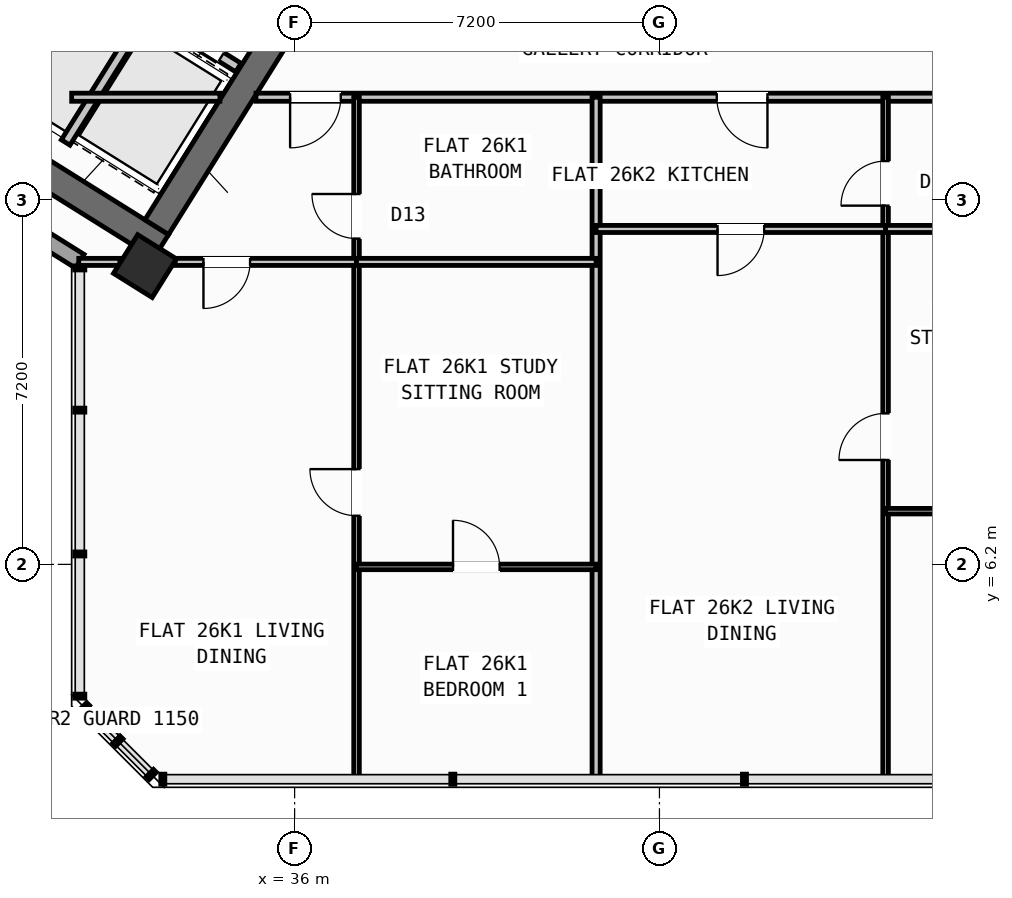
"""IFC4 building model, lengths in metres.
Left out: names, types, materials, properties, quantities, classifications, styles, units other than length and angle.
Written with IfcOpenShell. Run it as: python <this file> out.ifc"""

import sys

from ifc_helpers import new_model, si_unit, direction, frame, frame_2d, origin, origin_2d, place, context, subcontext, project, spatial, rectangle, hollow_rectangle, extrude, source, transform, mapped, element, fill, save


model = new_model("IFC4")
c1 = context("Model", 3, precision=1e-05, world=origin(), true_north=direction((0.0, 1.0)))
c2 = subcontext(c1, "Body", "Model", "MODEL_VIEW")
j1 = project(units=[si_unit("LENGTHUNIT", "METRE"), si_unit("PLANEANGLEUNIT", "RADIAN")], contexts=[c1])
p1 = place(None, origin())
s1 = spatial("IfcSite", under=j1, at=p1, CompositionType="ELEMENT")
p2 = place(p1, origin())
s2 = spatial("IfcBuilding", under=s1, at=p2, CompositionType="ELEMENT")
p3 = place(p2, frame((0.0, 0.0, 105.3)))
s3 = spatial("IfcBuildingStorey", under=s2, at=p3, CompositionType="ELEMENT", Elevation=105.3)
p4 = place(p3, frame((33.366, 12.477, 0.0), z_axis=(0.0, 0.0, 1.0), x_axis=(-0.848047359947, 0.529920442413, 0.0)))
e1 = element("IfcWall", 1, at=p4, inside=s3, PredefinedType="SHEAR", context=c2, shape_type="SweptSolid", body=[
    extrude(rectangle(XDim=13.14, YDim=0.55, at=frame_2d((6.57, 0.0))), origin(), (0.0, 0.0, 1.0), 3.35),
])
p5 = place(p3, frame((36.683, 18.304, 0.0), z_axis=(0.0, 0.0, 1.0), x_axis=(-0.529896466841, -0.848062341122, 0.0)))
e2 = element("IfcWall", 2, at=p5, inside=s3, PredefinedType="SHEAR", context=c2, shape_type="SweptSolid", body=[
    extrude(rectangle(XDim=6.425, YDim=0.55, at=frame_2d((3.212, 0.0))), origin(), (0.0, 0.0, 1.0), 3.35),
])
m1 = source(origin(), c2, "Body", "SweptSolid", [
    extrude(hollow_rectangle(XDim=0.9, YDim=0.9, WallThickness=0.036, at=origin_2d()), origin(), (0.0, 0.0, 1.0), 3.6),
])
p6 = place(p3, frame((33.046, 12.087, 0.0), z_axis=(0.0, 0.0, 1.0), x_axis=(-0.848048096156, 0.529919264233, 0.0)))
e3 = element("IfcColumn", 3, at=p6, inside=s3, PredefinedType="COLUMN", context=c2, shape_type="MappedRepresentation", body=[
    mapped(m1, transform((0.0, 0.0, 0.0), scale=1.0)),
])
p7 = place(p3, frame((31.76, 12.183, 0.0), z_axis=(0.0, 0.0, 1.0), x_axis=(-0.848047074256, 0.529920899612, 0.0)))
e4 = element("IfcWall", 4, at=p7, inside=s3, PredefinedType="STANDARD", context=c2, shape_type="SweptSolid", body=[
    extrude(rectangle(XDim=30.652, YDim=0.32, at=frame_2d((15.326, 0.0))), origin(), (0.0, 0.0, 1.0), 3.35),
])
p8 = place(p7, frame((15.153, 0.0, 0.0)))
e5 = element("IfcOpeningElement", 5, at=p8, cuts=e4, PredefinedType="OPENING", context=c2, shape_type="SweptSolid", body=[
    extrude(rectangle(XDim=1.2, YDim=2.15, at=frame_2d((0.6, 1.075))), frame((0.0, 0.17, 0.0), z_axis=(0.0, -1.0, 0.0), x_axis=(1.0, 0.0, 0.0)), (0.0, 0.0, 1.0), 0.34),
])
p9 = place(p7, frame((2.002, 0.0, 0.8)))
e6 = element("IfcOpeningElement", 6, at=p9, cuts=e4, PredefinedType="OPENING", context=c2, shape_type="SweptSolid", body=[
    extrude(rectangle(XDim=2.1, YDim=1.55, at=frame_2d((1.05, 0.775))), frame((0.0, 0.17, 0.0), z_axis=(0.0, -1.0, 0.0), x_axis=(1.0, 0.0, 0.0)), (0.0, 0.0, 1.0), 0.34),
])
p10 = place(p7, frame((7.206, 0.0, 0.8)))
e7 = element("IfcOpeningElement", 7, at=p10, cuts=e4, PredefinedType="OPENING", context=c2, shape_type="SweptSolid", body=[
    extrude(rectangle(XDim=2.1, YDim=1.55, at=frame_2d((1.05, 0.775))), frame((0.0, 0.17, 0.0), z_axis=(0.0, -1.0, 0.0), x_axis=(1.0, 0.0, 0.0)), (0.0, 0.0, 1.0), 0.34),
])
p11 = place(p7, frame((12.648, 0.0, 1.0)))
e8 = element("IfcOpeningElement", 8, at=p11, cuts=e4, PredefinedType="OPENING", context=c2, shape_type="SweptSolid", body=[
    extrude(rectangle(XDim=0.9, YDim=1.25, at=frame_2d((0.45, 0.625))), frame((0.0, 0.17, 0.0), z_axis=(0.0, -1.0, 0.0), x_axis=(1.0, 0.0, 0.0)), (0.0, 0.0, 1.0), 0.34),
])
p12 = place(p7, frame((20.628, 0.0, 0.95)))
e9 = element("IfcOpeningElement", 9, at=p12, cuts=e4, PredefinedType="OPENING", context=c2, shape_type="SweptSolid", body=[
    extrude(rectangle(XDim=1.2, YDim=1.4, at=frame_2d((0.6, 0.7))), frame((0.0, 0.17, 0.0), z_axis=(0.0, -1.0, 0.0), x_axis=(1.0, 0.0, 0.0)), (0.0, 0.0, 1.0), 0.34),
])
p13 = place(p7, frame((26.008, 0.0, 1.0)))
e10 = element("IfcOpeningElement", 10, at=p13, cuts=e4, PredefinedType="OPENING", context=c2, shape_type="SweptSolid", body=[
    extrude(rectangle(XDim=0.9, YDim=1.25, at=frame_2d((0.45, 0.625))), frame((0.0, 0.17, 0.0), z_axis=(0.0, -1.0, 0.0), x_axis=(1.0, 0.0, 0.0)), (0.0, 0.0, 1.0), 0.34),
])
p14 = place(p7, frame((28.408, 0.0, 1.0)))
e11 = element("IfcOpeningElement", 11, at=p14, cuts=e4, PredefinedType="OPENING", context=c2, shape_type="SweptSolid", body=[
    extrude(rectangle(XDim=0.9, YDim=1.25, at=frame_2d((0.45, 0.625))), frame((0.0, 0.17, 0.0), z_axis=(0.0, -1.0, 0.0), x_axis=(1.0, 0.0, 0.0)), (0.0, 0.0, 1.0), 0.34),
])
p15 = place(p3, frame((31.288, 18.256, 0.0), z_axis=(0.0, 0.0, 1.0), x_axis=(-0.529943379326, -0.848033026897, 0.0)))
e12 = element("IfcWall", 12, at=p15, inside=s3, PredefinedType="SHEAR", context=c2, shape_type="SweptSolid", body=[
    extrude(rectangle(XDim=3.16, YDim=0.26, at=frame_2d((1.58, 0.0))), origin(), (0.0, 0.0, 1.0), 3.35),
])
p16 = place(p3, frame((34.891, 16.005, 0.0), z_axis=(0.0, 0.0, 1.0), x_axis=(-0.848062873452, 0.529895614884, 0.0)))
e13 = element("IfcWall", 13, at=p16, inside=s3, PredefinedType="STANDARD", context=c2, shape_type="SweptSolid", body=[
    extrude(rectangle(XDim=4.248, YDim=0.2, at=frame_2d((2.124, 0.0))), origin(), (0.0, 0.0, 1.0), 3.34),
])
p17 = place(p16, frame((0.398, 0.0, 0.0)))
e14 = element("IfcOpeningElement", 14, at=p17, cuts=e13, PredefinedType="OPENING", context=c2, shape_type="SweptSolid", body=[
    extrude(rectangle(XDim=1.3, YDim=2.2, at=frame_2d((0.65, 1.1))), frame((0.0, 0.11, 0.0), z_axis=(0.0, -1.0, 0.0), x_axis=(1.0, 0.0, 0.0)), (0.0, 0.0, 1.0), 0.22),
])
p18 = place(p16, frame((2.473, 0.0, 0.0)))
e15 = element("IfcOpeningElement", 15, at=p18, cuts=e13, PredefinedType="OPENING", context=c2, shape_type="SweptSolid", body=[
    extrude(rectangle(XDim=1.45, YDim=2.25, at=frame_2d((0.725, 1.125))), frame((0.0, 0.11, 0.0), z_axis=(0.0, -1.0, 0.0), x_axis=(1.0, 0.0, 0.0)), (0.0, 0.0, 1.0), 0.22),
])
p19 = place(p3, frame((33.029, 17.003, 0.0), z_axis=(0.0, 0.0, 1.0), x_axis=(-0.529916267533, -0.848049968695, 0.0)))
e16 = element("IfcWall", 16, at=p19, inside=s3, PredefinedType="STANDARD", context=c2, shape_type="SweptSolid", body=[
    extrude(rectangle(XDim=2.92, YDim=0.2, at=frame_2d((1.46, 0.0))), origin(), (0.0, 0.0, 1.0), 3.34),
])
p20 = place(p3, frame((31.6, 15.42, 0.0), z_axis=(0.0, 0.0, 1.0), x_axis=(1.0, 0.0, 0.0)))
e17 = element("IfcWall", 17, at=p20, inside=s3, PredefinedType="PARTITIONING", context=c2, shape_type="SweptSolid", body=[
    extrude(rectangle(XDim=2.925, YDim=0.16, at=frame_2d((1.462, 0.0))), origin(), (0.0, 0.0, 1.0), 3.34),
])
p21 = place(p3, frame((35.237, 15.42, 0.0), z_axis=(0.0, 0.0, 1.0), x_axis=(1.0, 0.0, 0.0)))
e18 = element("IfcWall", 18, at=p21, inside=s3, PredefinedType="PARTITIONING", context=c2, shape_type="SweptSolid", body=[
    extrude(rectangle(XDim=15.432, YDim=0.16, at=frame_2d((7.716, 0.0))), origin(), (0.0, 0.0, 1.0), 3.34),
])
p22 = place(p21, frame((0.674, 0.0, 0.0)))
e19 = element("IfcOpeningElement", 19, at=p22, cuts=e18, PredefinedType="OPENING", context=c2, shape_type="SweptSolid", body=[
    extrude(rectangle(XDim=1.0, YDim=2.1, at=frame_2d((0.5, 1.05))), frame((0.0, 0.09, 0.0), z_axis=(0.0, -1.0, 0.0), x_axis=(1.0, 0.0, 0.0)), (0.0, 0.0, 1.0), 0.18),
])
p23 = place(p21, frame((9.094, 0.0, 0.0)))
e20 = element("IfcOpeningElement", 20, at=p23, cuts=e18, PredefinedType="OPENING", context=c2, shape_type="SweptSolid", body=[
    extrude(rectangle(XDim=1.0, YDim=2.1, at=frame_2d((0.5, 1.05))), frame((0.0, 0.09, 0.0), z_axis=(0.0, -1.0, 0.0), x_axis=(1.0, 0.0, 0.0)), (0.0, 0.0, 1.0), 0.18),
])
p24 = place(p3, frame((50.119, 16.333, 0.0), z_axis=(0.0, 0.0, 1.0), x_axis=(-0.587749856981, 0.809042709391, 0.0)))
e21 = element("IfcWall", 21, at=p24, inside=s3, PredefinedType="STANDARD", context=c2, shape_type="SweptSolid", body=[
    extrude(rectangle(XDim=2.96, YDim=0.2, at=frame_2d((1.48, 0.0))), origin(), (0.0, 0.0, 1.0), 3.34),
])
p25 = place(p24, frame((0.53, 0.0, 0.0)))
e22 = element("IfcOpeningElement", 22, at=p25, cuts=e21, PredefinedType="OPENING", context=c2, shape_type="SweptSolid", body=[
    extrude(rectangle(XDim=1.5, YDim=2.15, at=frame_2d((0.75, 1.075))), frame((0.0, 0.11, 0.0), z_axis=(0.0, -1.0, 0.0), x_axis=(1.0, 0.0, 0.0)), (0.0, 0.0, 1.0), 0.22),
])
p26 = place(p3, frame((41.95, 1.96, 0.0), z_axis=(0.0, 0.0, 1.0), x_axis=(0.0, 1.0, 0.0)))
e23 = element("IfcWall", 23, at=p26, inside=s3, PredefinedType="PARTITIONING", context=c2, shape_type="SweptSolid", body=[
    extrude(rectangle(XDim=13.46, YDim=0.16, at=frame_2d((6.73, 0.0))), origin(), (0.0, 0.0, 1.0), 3.34),
])
p27 = place(p3, frame((37.222, 1.96, 0.0), z_axis=(0.0, 0.0, 1.0), x_axis=(0.0, 1.0, 0.0)))
e24 = element("IfcWall", 24, at=p27, inside=s3, PredefinedType="PARTITIONING", context=c2, shape_type="SweptSolid", body=[
    extrude(rectangle(XDim=13.46, YDim=0.11, at=frame_2d((6.73, 0.0))), origin(), (0.0, 0.0, 1.0), 3.34),
])
p28 = place(p27, frame((5.2, 0.0, 0.0)))
e25 = element("IfcOpeningElement", 25, at=p28, cuts=e24, PredefinedType="OPENING", context=c2, shape_type="SweptSolid", body=[
    extrude(rectangle(XDim=0.92, YDim=2.08, at=frame_2d((0.46, 1.04))), frame((0.0, 0.065, 0.0), z_axis=(0.0, -1.0, 0.0), x_axis=(1.0, 0.0, 0.0)), (0.0, 0.0, 1.0), 0.13),
])
p29 = place(p27, frame((10.67, 0.0, 0.0)))
e26 = element("IfcOpeningElement", 26, at=p29, cuts=e24, PredefinedType="OPENING", context=c2, shape_type="SweptSolid", body=[
    extrude(rectangle(XDim=0.88, YDim=2.08, at=frame_2d((0.44, 1.04))), frame((0.0, 0.065, 0.0), z_axis=(0.0, -1.0, 0.0), x_axis=(1.0, 0.0, 0.0)), (0.0, 0.0, 1.0), 0.13),
])
p30 = place(p3, frame((31.74, 12.17, 0.0), z_axis=(0.0, 0.0, 1.0), x_axis=(1.0, 0.0, 0.0)))
e27 = element("IfcWall", 27, at=p30, inside=s3, PredefinedType="PLUMBINGWALL", context=c2, shape_type="SweptSolid", body=[
    extrude(rectangle(XDim=0.813, YDim=0.14, at=frame_2d((0.407, 0.0))), origin(), (0.0, 0.0, 1.0), 3.34),
])
p31 = place(p3, frame((33.643, 12.17, 0.0), z_axis=(0.0, 0.0, 1.0), x_axis=(1.0, 0.0, 0.0)))
e28 = element("IfcWall", 28, at=p31, inside=s3, PredefinedType="PLUMBINGWALL", context=c2, shape_type="SweptSolid", body=[
    extrude(rectangle(XDim=3.579, YDim=0.14, at=frame_2d((1.79, 0.0))), origin(), (0.0, 0.0, 1.0), 2.525),
])
p32 = place(p31, frame((0.558, 0.0, 0.0)))
e29 = element("IfcOpeningElement", 29, at=p32, cuts=e28, PredefinedType="OPENING", context=c2, shape_type="SweptSolid", body=[
    extrude(rectangle(XDim=0.92, YDim=2.08, at=frame_2d((0.46, 1.04))), frame((0.0, 0.08, 0.0), z_axis=(0.0, -1.0, 0.0), x_axis=(1.0, 0.0, 0.0)), (0.0, 0.0, 1.0), 0.16),
])
p33 = place(p3, frame((37.222, 12.17, 0.0), z_axis=(0.0, 0.0, 1.0), x_axis=(1.0, 0.0, 0.0)))
e30 = element("IfcWall", 30, at=p33, inside=s3, PredefinedType="PLUMBINGWALL", context=c2, shape_type="SweptSolid", body=[
    extrude(rectangle(XDim=4.728, YDim=0.14, at=frame_2d((2.364, 0.0))), origin(), (0.0, 0.0, 1.0), 2.525),
])
p34 = place(p3, frame((37.222, 6.15, 0.0), z_axis=(0.0, 0.0, 1.0), x_axis=(1.0, 0.0, 0.0)))
e31 = element("IfcWall", 31, at=p34, inside=s3, PredefinedType="PARTITIONING", context=c2, shape_type="SweptSolid", body=[
    extrude(rectangle(XDim=4.728, YDim=0.11, at=frame_2d((2.364, 0.0))), origin(), (0.0, 0.0, 1.0), 3.34),
])
p35 = place(p34, frame((1.904, 0.0, 0.0)))
e32 = element("IfcOpeningElement", 32, at=p35, cuts=e31, PredefinedType="OPENING", context=c2, shape_type="SweptSolid", body=[
    extrude(rectangle(XDim=0.92, YDim=2.08, at=frame_2d((0.46, 1.04))), frame((0.0, 0.065, 0.0), z_axis=(0.0, -1.0, 0.0), x_axis=(1.0, 0.0, 0.0)), (0.0, 0.0, 1.0), 0.13),
])
p36 = place(p3, frame((47.663, 1.96, 0.0), z_axis=(0.0, 0.0, 1.0), x_axis=(0.0, 1.0, 0.0)))
e33 = element("IfcWall", 33, at=p36, inside=s3, PredefinedType="PARTITIONING", context=c2, shape_type="SweptSolid", body=[
    extrude(rectangle(XDim=13.46, YDim=0.11, at=frame_2d((6.73, 0.0))), origin(), (0.0, 0.0, 1.0), 3.34),
])
p37 = place(p36, frame((6.3, 0.0, 0.0)))
e34 = element("IfcOpeningElement", 34, at=p37, cuts=e33, PredefinedType="OPENING", context=c2, shape_type="SweptSolid", body=[
    extrude(rectangle(XDim=0.92, YDim=2.08, at=frame_2d((0.46, 1.04))), frame((0.0, 0.065, 0.0), z_axis=(0.0, -1.0, 0.0), x_axis=(1.0, 0.0, 0.0)), (0.0, 0.0, 1.0), 0.13),
])
p38 = place(p36, frame((11.32, 0.0, 0.0)))
e35 = element("IfcOpeningElement", 35, at=p38, cuts=e33, PredefinedType="OPENING", context=c2, shape_type="SweptSolid", body=[
    extrude(rectangle(XDim=0.88, YDim=2.08, at=frame_2d((0.44, 1.04))), frame((0.0, 0.065, 0.0), z_axis=(0.0, -1.0, 0.0), x_axis=(1.0, 0.0, 0.0)), (0.0, 0.0, 1.0), 0.13),
])
p39 = place(p3, frame((41.95, 12.82, 0.0), z_axis=(0.0, 0.0, 1.0), x_axis=(1.0, 0.0, 0.0)))
e36 = element("IfcWall", 36, at=p39, inside=s3, PredefinedType="PLUMBINGWALL", context=c2, shape_type="SweptSolid", body=[
    extrude(rectangle(XDim=5.713, YDim=0.14, at=frame_2d((2.856, 0.0))), origin(), (0.0, 0.0, 1.0), 2.525),
])
p40 = place(p39, frame((2.396, 0.0, 0.0)))
e37 = element("IfcOpeningElement", 37, at=p40, cuts=e36, PredefinedType="OPENING", context=c2, shape_type="SweptSolid", body=[
    extrude(rectangle(XDim=0.92, YDim=2.08, at=frame_2d((0.46, 1.04))), frame((0.0, 0.08, 0.0), z_axis=(0.0, -1.0, 0.0), x_axis=(1.0, 0.0, 0.0)), (0.0, 0.0, 1.0), 0.16),
])
p41 = place(p3, frame((47.663, 12.82, 0.0), z_axis=(0.0, 0.0, 1.0), x_axis=(1.0, 0.0, 0.0)))
e38 = element("IfcWall", 38, at=p41, inside=s3, PredefinedType="PLUMBINGWALL", context=c2, shape_type="SweptSolid", body=[
    extrude(rectangle(XDim=4.438, YDim=0.14, at=frame_2d((2.219, 0.0))), origin(), (0.0, 0.0, 1.0), 2.525),
])
p42 = place(p3, frame((47.663, 7.25, 0.0), z_axis=(0.0, 0.0, 1.0), x_axis=(1.0, 0.0, 0.0)))
e39 = element("IfcWall", 39, at=p42, inside=s3, PredefinedType="PARTITIONING", context=c2, shape_type="SweptSolid", body=[
    extrude(rectangle(XDim=4.597, YDim=0.11, at=frame_2d((2.298, 0.0))), origin(), (0.0, 0.0, 1.0), 3.34),
])
p43 = place(p42, frame((1.608, 0.0, 0.0)))
e40 = element("IfcOpeningElement", 40, at=p43, cuts=e39, PredefinedType="OPENING", context=c2, shape_type="SweptSolid", body=[
    extrude(rectangle(XDim=0.92, YDim=2.08, at=frame_2d((0.46, 1.04))), frame((0.0, 0.065, 0.0), z_axis=(0.0, -1.0, 0.0), x_axis=(1.0, 0.0, 0.0)), (0.0, 0.0, 1.0), 0.13),
])
m2 = source(origin(), c2, "Body", "SweptSolid", [
    extrude(rectangle(XDim=1.3, YDim=2.2, at=frame_2d((0.65, 1.1))), frame((0.0, 0.025, 0.0), z_axis=(0.0, -1.0, 0.0), x_axis=(1.0, 0.0, 0.0)), (0.0, 0.0, 1.0), 0.05),
])
p44 = place(p17, origin())
e41 = element("IfcDoor", 41, at=p44, inside=s3, OperationType="DOUBLE_DOOR_SLIDING", PredefinedType="DOOR", context=c2, shape_type="MappedRepresentation", body=[
    mapped(m2, transform((0.0, 0.0, 0.0), scale=1.0)),
])
fill(e14, e41)
m3 = source(origin(), c2, "Body", "SweptSolid", [
    extrude(rectangle(XDim=0.92, YDim=2.08, at=frame_2d((0.46, 1.04))), frame((0.0, 0.025, 0.0), z_axis=(0.0, -1.0, 0.0), x_axis=(1.0, 0.0, 0.0)), (0.0, 0.0, 1.0), 0.05),
])
p45 = place(p28, origin())
e42 = element("IfcDoor", 42, at=p45, inside=s3, OperationType="SINGLE_SWING_RIGHT", PredefinedType="DOOR", context=c2, shape_type="MappedRepresentation", body=[
    mapped(m3, transform((0.0, 0.0, 0.0), scale=1.0)),
])
fill(e25, e42)
p46 = place(p35, origin())
e43 = element("IfcDoor", 43, at=p46, inside=s3, OperationType="SINGLE_SWING_LEFT", PredefinedType="DOOR", context=c2, shape_type="MappedRepresentation", body=[
    mapped(m3, transform((0.0, 0.0, 0.0), scale=1.0)),
])
fill(e32, e43)
m4 = source(origin(), c2, "Body", "SweptSolid", [
    extrude(rectangle(XDim=1.0, YDim=2.1, at=frame_2d((0.5, 1.05))), frame((0.0, 0.025, 0.0), z_axis=(0.0, -1.0, 0.0), x_axis=(1.0, 0.0, 0.0)), (0.0, 0.0, 1.0), 0.05),
])
p47 = place(p22, frame((1.0, 0.0, 0.0), z_axis=(0.0, 0.0, 1.0), x_axis=(-1.0, 0.0, 0.0)))
e44 = element("IfcDoor", 44, at=p47, inside=s3, OperationType="SINGLE_SWING_RIGHT", PredefinedType="DOOR", context=c2, shape_type="MappedRepresentation", body=[
    mapped(m4, transform((0.0, 0.0, 0.0), scale=1.0)),
])
fill(e19, e44)
p48 = place(p32, frame((0.92, 0.0, 0.0), z_axis=(0.0, 0.0, 1.0), x_axis=(-1.0, 0.0, 0.0)))
e45 = element("IfcDoor", 45, at=p48, inside=s3, OperationType="SINGLE_SWING_RIGHT", PredefinedType="DOOR", context=c2, shape_type="MappedRepresentation", body=[
    mapped(m3, transform((0.0, 0.0, 0.0), scale=1.0)),
])
fill(e29, e45)
m5 = source(origin(), c2, "Body", "SweptSolid", [
    extrude(rectangle(XDim=0.88, YDim=2.08, at=frame_2d((0.44, 1.04))), frame((0.0, 0.025, 0.0), z_axis=(0.0, -1.0, 0.0), x_axis=(1.0, 0.0, 0.0)), (0.0, 0.0, 1.0), 0.05),
])
p49 = place(p29, origin())
e46 = element("IfcDoor", 46, at=p49, inside=s3, OperationType="SINGLE_SWING_RIGHT", PredefinedType="DOOR", context=c2, shape_type="MappedRepresentation", body=[
    mapped(m5, transform((0.0, 0.0, 0.0), scale=1.0)),
])
fill(e26, e46)
p50 = place(p37, origin())
e47 = element("IfcDoor", 47, at=p50, inside=s3, OperationType="SINGLE_SWING_LEFT", PredefinedType="DOOR", context=c2, shape_type="MappedRepresentation", body=[
    mapped(m3, transform((0.0, 0.0, 0.0), scale=1.0)),
])
fill(e34, e47)
p51 = place(p23, frame((1.0, 0.0, 0.0), z_axis=(0.0, 0.0, 1.0), x_axis=(-1.0, 0.0, 0.0)))
e48 = element("IfcDoor", 48, at=p51, inside=s3, OperationType="SINGLE_SWING_LEFT", PredefinedType="DOOR", context=c2, shape_type="MappedRepresentation", body=[
    mapped(m4, transform((0.0, 0.0, 0.0), scale=1.0)),
])
fill(e20, e48)
p52 = place(p40, frame((0.92, 0.0, 0.0), z_axis=(0.0, 0.0, 1.0), x_axis=(-1.0, 0.0, 0.0)))
e49 = element("IfcDoor", 49, at=p52, inside=s3, OperationType="SINGLE_SWING_RIGHT", PredefinedType="DOOR", context=c2, shape_type="MappedRepresentation", body=[
    mapped(m3, transform((0.0, 0.0, 0.0), scale=1.0)),
])
fill(e37, e49)
p53 = place(p38, origin())
e50 = element("IfcDoor", 50, at=p53, inside=s3, OperationType="SINGLE_SWING_LEFT", PredefinedType="DOOR", context=c2, shape_type="MappedRepresentation", body=[
    mapped(m5, transform((0.0, 0.0, 0.0), scale=1.0)),
])
fill(e35, e50)
save(model, sys.argv[1])
